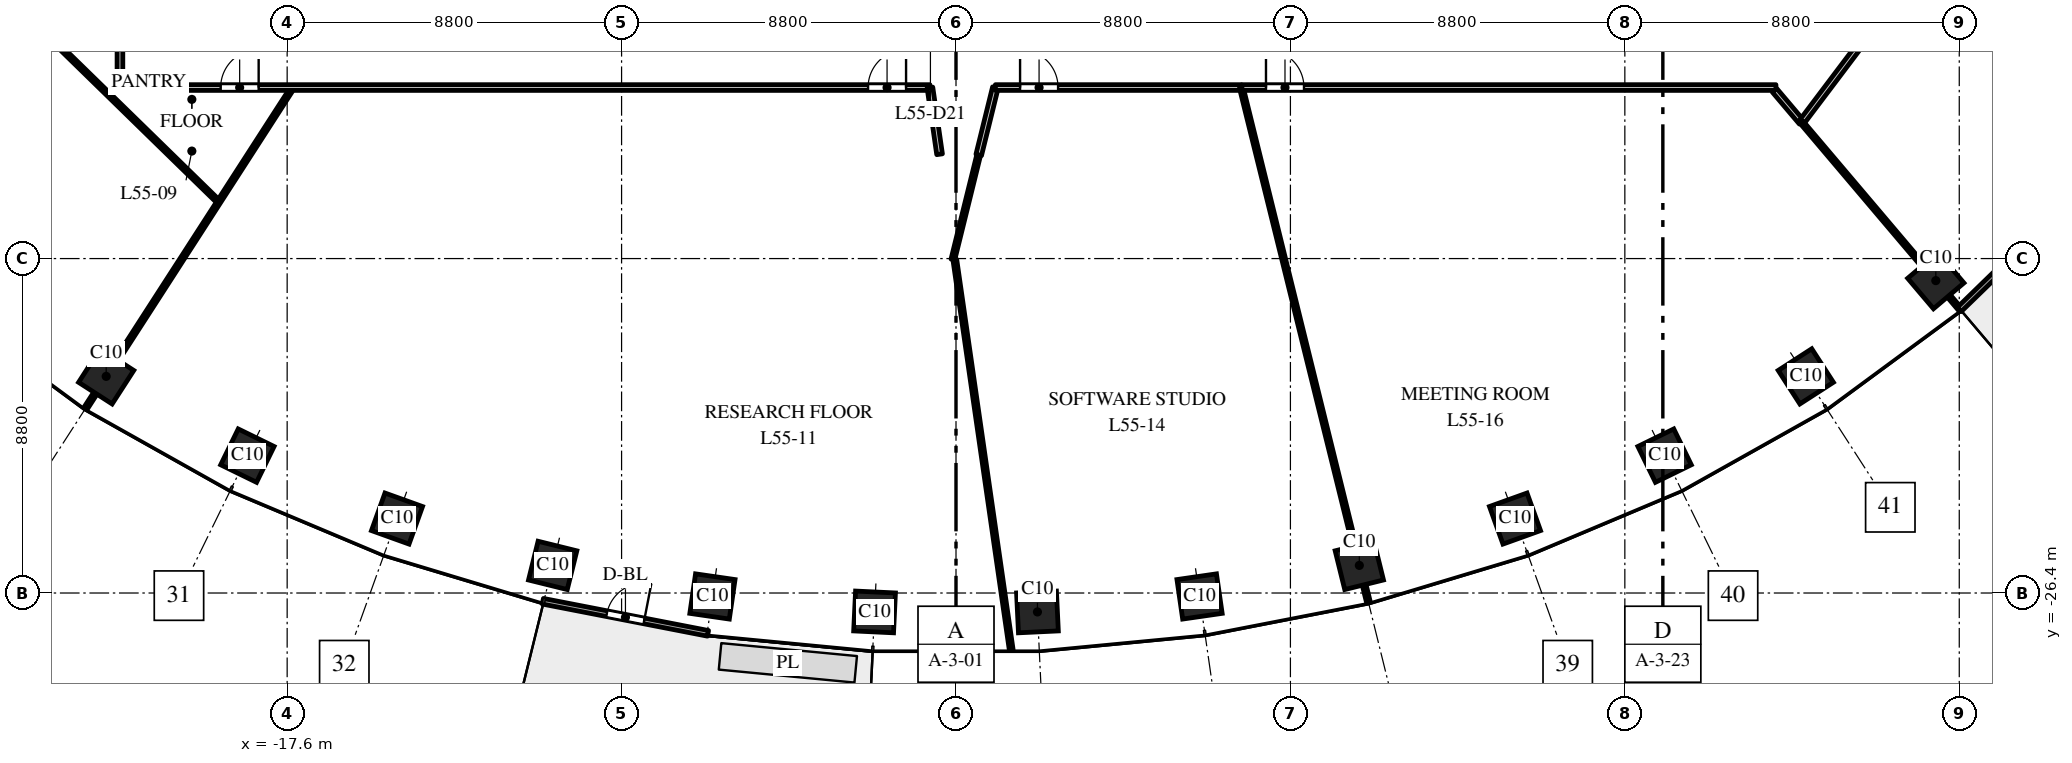
"""IFC4 building model, lengths in metres.
Left out: names, types, materials, properties, quantities, classifications, styles, units other than length and angle.
Written with IfcOpenShell. Run it as: python <this file> out.ifc"""

import sys

from ifc_helpers import new_model, si_unit, direction, frame, frame_2d, origin, origin_2d, place, context, subcontext, project, spatial, rectangle, extrude, element, fill, save


model = new_model("IFC4")
c1 = context("Model", 3, precision=1e-05, world=origin(), true_north=direction((0.0, 1.0)))
c2 = subcontext(c1, "Body", "Model", "MODEL_VIEW")
j1 = project(units=[si_unit("LENGTHUNIT", "METRE"), si_unit("PLANEANGLEUNIT", "RADIAN")], contexts=[c1])
p1 = place(None, origin())
s1 = spatial("IfcSite", under=j1, at=p1, CompositionType="ELEMENT")
p2 = place(p1, origin())
s2 = spatial("IfcBuilding", under=s1, at=p2, CompositionType="ELEMENT")
p3 = place(p2, frame((0.0, 0.0, 261.5)))
s3 = spatial("IfcBuildingStorey", under=s2, at=p3, CompositionType="ELEMENT", Elevation=261.5)
for number, where, z_axis, x_axis in (
    (1, (-22.362, -20.7, 0.0), (0.0, 0.0, 1.0), (0.84, -0.542, 0.0)),
    (2, (-18.646, -22.785, 0.0), (0.0, 0.0, 1.0), (0.898, -0.439, 0.0)),
    (3, (-14.709, -24.441, 0.0), (0.0, 0.0, 1.0), (0.941, -0.338, 0.0)),
    (4, (-10.613, -25.674, 0.0), (0.0, 0.0, 1.0), (0.971, -0.24, 0.0)),
    (5, (-6.409, -26.491, 0.0), (0.0, 0.0, 1.0), (0.99, -0.143, 0.0)),
    (6, (-2.143, -26.898, 0.0), (0.0, 0.0, 1.0), (0.999, -0.048, 0.0)),
    (7, (2.143, -26.898, 0.0), (0.0, 0.0, 1.0), (0.999, 0.048, 0.0)),
    (8, (6.409, -26.491, 0.0), (0.0, 0.0, 1.0), (0.99, 0.143, 0.0)),
    (9, (10.613, -25.674, 0.0), (0.0, 0.0, 1.0), (0.971, 0.24, 0.0)),
    (10, (14.709, -24.441, 0.0), (0.0, 0.0, 1.0), (0.941, 0.338, 0.0)),
    (11, (18.646, -22.785, 0.0), (0.0, 0.0, 1.0), (0.898, 0.439, 0.0)),
    (12, (22.362, -20.7, 0.0), (0.0, 0.0, 1.0), (0.84, 0.542, 0.0)),
    (13, (25.783, -18.18, 0.0), (0.0, 0.0, 1.0), (0.763, 0.646, 0.0)),
):
    element("IfcColumn", number, at=place(p3, frame(where, z_axis=z_axis, x_axis=x_axis)), inside=s3, PredefinedType="COLUMN", context=c2, shape_type="SweptSolid", body=[
        extrude(rectangle(XDim=1.05, YDim=1.05, at=origin_2d()), origin(), (0.0, 0.0, 1.0), 4.0),
    ])
p4 = place(p3, frame((-10.871, -26.617, 0.0), z_axis=(0.0, 0.0, 1.0), x_axis=(0.981631174778, -0.190788460615, 0.0)))
e14 = element("IfcWall", 14, at=p4, inside=s3, PredefinedType="STANDARD", context=c2, shape_type="SweptSolid", body=[
    extrude(rectangle(XDim=4.426, YDim=0.15, at=frame_2d((2.213, 0.0))), origin(), (0.0, 0.0, 1.0), 3.7),
])
p5 = place(p4, frame((1.713, 0.0, 0.0)))
e15 = element("IfcOpeningElement", 15, at=p5, cuts=e14, PredefinedType="OPENING", context=c2, shape_type="SweptSolid", body=[
    extrude(rectangle(XDim=1.0, YDim=2.4, at=frame_2d((0.5, 1.2))), frame((0.0, 0.085, 0.0), z_axis=(0.0, -1.0, 0.0), x_axis=(1.0, 0.0, 0.0)), (0.0, 0.0, 1.0), 0.17),
])
p6 = place(p3, frame((26.396, -18.943, 0.0), z_axis=(0.0, 0.0, 1.0), x_axis=(0.717214761864, 0.696852197647, 0.0)))
e16 = element("IfcWall", 16, at=p6, inside=s3, PredefinedType="STANDARD", context=c2, shape_type="SweptSolid", body=[
    extrude(rectangle(XDim=4.424, YDim=0.15, at=frame_2d((2.212, 0.0))), origin(), (0.0, 0.0, 1.0), 3.7),
])
p7 = place(p6, frame((1.712, 0.0, 0.0)))
e17 = element("IfcOpeningElement", 17, at=p7, cuts=e16, PredefinedType="OPENING", context=c2, shape_type="SweptSolid", body=[
    extrude(rectangle(XDim=1.0, YDim=2.4, at=frame_2d((0.5, 1.2))), frame((0.0, 0.085, 0.0), z_axis=(0.0, -1.0, 0.0), x_axis=(1.0, 0.0, 0.0)), (0.0, 0.0, 1.0), 0.17),
])
p8 = place(p3, frame((-24.866, -10.778, 0.0), z_axis=(0.0, 0.0, 1.0), x_axis=(0.715632814242, -0.698476681916, 0.0)))
e18 = element("IfcWall", 18, at=p8, inside=s3, PredefinedType="PARTITIONING", context=c2, shape_type="SweptSolid", body=[
    extrude(rectangle(XDim=7.585, YDim=0.1, at=frame_2d((3.792, 0.0))), origin(), (0.0, 0.0, 1.0), 2.75),
])
p9 = place(p3, frame((-22.905, -21.542, 0.0), z_axis=(0.0, 0.0, 1.0), x_axis=(0.542277075573, 0.840199722273, 0.0)))
e19 = element("IfcWall", 19, at=p9, inside=s3, PredefinedType="PARTITIONING", context=c2, shape_type="SweptSolid", body=[
    extrude(rectangle(XDim=9.958, YDim=0.1, at=frame_2d((4.979, 0.0))), origin(), (0.0, 0.0, 1.0), 3.0),
])
p10 = place(p3, frame((-22.0, -13.1, 0.0), z_axis=(0.0, 0.0, 1.0), x_axis=(0.0, 1.0, 0.0)))
e20 = element("IfcWall", 20, at=p10, inside=s3, PredefinedType="PARTITIONING", context=c2, shape_type="SweptSolid", body=[
    extrude(rectangle(XDim=2.4, YDim=0.15, at=frame_2d((1.2, 0.0))), origin(), (0.0, 0.0, 1.0), 3.7),
])
p11 = place(p3, frame((-22.0, -13.1, 0.0), z_axis=(0.0, 0.0, 1.0), x_axis=(1.0, 0.0, 0.0)))
e21 = element("IfcWall", 21, at=p11, inside=s3, PredefinedType="PARTITIONING", context=c2, shape_type="SweptSolid", body=[
    extrude(rectangle(XDim=21.314, YDim=0.15, at=frame_2d((10.657, 0.0))), origin(), (0.0, 0.0, 1.0), 2.75),
])
p12 = place(p11, frame((2.65, 0.0, 0.0)))
e22 = element("IfcOpeningElement", 22, at=p12, cuts=e21, PredefinedType="OPENING", context=c2, shape_type="SweptSolid", body=[
    extrude(rectangle(XDim=1.0, YDim=2.1, at=frame_2d((0.5, 1.05))), frame((0.0, 0.085, 0.0), z_axis=(0.0, -1.0, 0.0), x_axis=(1.0, 0.0, 0.0)), (0.0, 0.0, 1.0), 0.17),
])
p13 = place(p11, frame((19.686, 0.0, 0.0)))
e23 = element("IfcOpeningElement", 23, at=p13, cuts=e21, PredefinedType="OPENING", context=c2, shape_type="SweptSolid", body=[
    extrude(rectangle(XDim=1.0, YDim=2.1, at=frame_2d((0.5, 1.05))), frame((0.0, 0.085, 0.0), z_axis=(0.0, -1.0, 0.0), x_axis=(1.0, 0.0, 0.0)), (0.0, 0.0, 1.0), 0.17),
])
p14 = place(p3, frame((-0.686, -13.1, 0.0), z_axis=(0.0, 0.0, 1.0), x_axis=(0.143329398439, -0.989675039366, 0.0)))
e24 = element("IfcWall", 24, at=p14, inside=s3, PredefinedType="PARTITIONING", context=c2, shape_type="SweptSolid", body=[
    extrude(rectangle(XDim=1.773, YDim=0.15, at=frame_2d((0.887, 0.0))), origin(), (0.0, 0.0, 1.0), 3.7),
])
p15 = place(p3, frame((-0.082, -17.625, 0.0), z_axis=(0.0, 0.0, 1.0), x_axis=(0.23980869536, 0.970820163382, 0.0)))
e25 = element("IfcWall", 25, at=p15, inside=s3, PredefinedType="PARTITIONING", context=c2, shape_type="SweptSolid", body=[
    extrude(rectangle(XDim=2.803, YDim=0.1, at=frame_2d((1.401, 0.0))), origin(), (0.0, 0.0, 1.0), 3.7),
])
p16 = place(p3, frame((-0.031, -17.628, 0.0), z_axis=(0.0, 0.0, 1.0), x_axis=(0.143055546046, -0.989714661276, 0.0)))
e26 = element("IfcWall", 26, at=p16, inside=s3, PredefinedType="PARTITIONING", context=c2, shape_type="SweptSolid", body=[
    extrude(rectangle(XDim=10.373, YDim=0.1, at=frame_2d((5.187, 0.0))), origin(), (0.0, 0.0, 1.0), 3.0),
])
p17 = place(p3, frame((0.598, -14.874, 0.0), z_axis=(0.0, 0.0, 1.0), x_axis=(0.239705101821, 0.970845746842, 0.0)))
e27 = element("IfcWall", 27, at=p17, inside=s3, PredefinedType="PARTITIONING", context=c2, shape_type="SweptSolid", body=[
    extrude(rectangle(XDim=1.827, YDim=0.15, at=frame_2d((0.914, 0.0))), origin(), (0.0, 0.0, 1.0), 3.7),
])
p18 = place(p3, frame((1.036, -13.1, 0.0), z_axis=(0.0, 0.0, 1.0), x_axis=(1.0, 0.0, 0.0)))
e28 = element("IfcWall", 28, at=p18, inside=s3, PredefinedType="PARTITIONING", context=c2, shape_type="SweptSolid", body=[
    extrude(rectangle(XDim=6.471, YDim=0.15, at=frame_2d((3.236, 0.0))), origin(), (0.0, 0.0, 1.0), 2.85),
])
p19 = place(p18, frame((0.65, 0.0, 0.0)))
e29 = element("IfcOpeningElement", 29, at=p19, cuts=e28, PredefinedType="OPENING", context=c2, shape_type="SweptSolid", body=[
    extrude(rectangle(XDim=1.0, YDim=2.1, at=frame_2d((0.5, 1.05))), frame((0.0, 0.085, 0.0), z_axis=(0.0, -1.0, 0.0), x_axis=(1.0, 0.0, 0.0)), (0.0, 0.0, 1.0), 0.17),
])
p20 = place(p3, frame((7.507, -13.1, 0.0), z_axis=(0.0, 0.0, 1.0), x_axis=(0.23986692401, -0.970805778086, 0.0)))
e30 = element("IfcWall", 30, at=p20, inside=s3, PredefinedType="PARTITIONING", context=c2, shape_type="SweptSolid", body=[
    extrude(rectangle(XDim=13.953, YDim=0.1, at=frame_2d((6.977, 0.0))), origin(), (0.0, 0.0, 1.0), 3.0),
])
p21 = place(p3, frame((7.524, -13.1, 0.0), z_axis=(0.0, 0.0, 1.0), x_axis=(1.0, 0.0, 0.0)))
e31 = element("IfcWall", 31, at=p21, inside=s3, PredefinedType="PARTITIONING", context=c2, shape_type="SweptSolid", body=[
    extrude(rectangle(XDim=14.052, YDim=0.15, at=frame_2d((7.026, 0.0))), origin(), (0.0, 0.0, 1.0), 2.85),
])
p22 = place(p21, frame((0.633, 0.0, 0.0)))
e32 = element("IfcOpeningElement", 32, at=p22, cuts=e31, PredefinedType="OPENING", context=c2, shape_type="SweptSolid", body=[
    extrude(rectangle(XDim=1.0, YDim=2.1, at=frame_2d((0.5, 1.05))), frame((0.0, 0.085, 0.0), z_axis=(0.0, -1.0, 0.0), x_axis=(1.0, 0.0, 0.0)), (0.0, 0.0, 1.0), 0.17),
])
p23 = place(p3, frame((21.541, -13.175, 0.0), z_axis=(0.0, 0.0, 1.0), x_axis=(0.646460291141, -0.762947633837, 0.0)))
e33 = element("IfcWall", 33, at=p23, inside=s3, PredefinedType="PARTITIONING", context=c2, shape_type="SweptSolid", body=[
    extrude(rectangle(XDim=1.098, YDim=0.15, at=frame_2d((0.549, 0.0))), origin(), (0.0, 0.0, 1.0), 3.7),
])
p24 = place(p3, frame((22.251, -14.013, 0.0), z_axis=(0.0, 0.0, 1.0), x_axis=(0.602435944628, 0.798167233492, 0.0)))
e34 = element("IfcWall", 34, at=p24, inside=s3, PredefinedType="PARTITIONING", context=c2, shape_type="SweptSolid", body=[
    extrude(rectangle(XDim=4.245, YDim=0.15, at=frame_2d((2.122, 0.0))), origin(), (0.0, 0.0, 1.0), 2.75),
])
p25 = place(p3, frame((22.251, -14.013, 0.0), z_axis=(0.0, 0.0, 1.0), x_axis=(0.646448300096, -0.76295779392, 0.0)))
e35 = element("IfcWall", 35, at=p25, inside=s3, PredefinedType="PARTITIONING", context=c2, shape_type="SweptSolid", body=[
    extrude(rectangle(XDim=6.465, YDim=0.1, at=frame_2d((3.232, 0.0))), origin(), (0.0, 0.0, 1.0), 3.0),
])
p26 = place(p5, origin())
e36 = element("IfcDoor", 36, at=p26, inside=s3, OperationType="SINGLE_SWING_RIGHT", PredefinedType="DOOR", context=c2, shape_type="SweptSolid", body=[
    extrude(rectangle(XDim=1.0, YDim=2.4, at=frame_2d((0.5, 1.2))), frame((0.0, 0.025, 0.0), z_axis=(0.0, -1.0, 0.0), x_axis=(1.0, 0.0, 0.0)), (0.0, 0.0, 1.0), 0.05),
])
fill(e15, e36)
p27 = place(p12, origin())
e37 = element("IfcDoor", 37, at=p27, inside=s3, OperationType="SINGLE_SWING_RIGHT", PredefinedType="DOOR", context=c2, shape_type="SweptSolid", body=[
    extrude(rectangle(XDim=1.0, YDim=2.1, at=frame_2d((0.5, 1.05))), frame((0.0, 0.025, 0.0), z_axis=(0.0, -1.0, 0.0), x_axis=(1.0, 0.0, 0.0)), (0.0, 0.0, 1.0), 0.05),
])
fill(e22, e37)
p28 = place(p13, origin())
e38 = element("IfcDoor", 38, at=p28, inside=s3, OperationType="SINGLE_SWING_RIGHT", PredefinedType="DOOR", context=c2, shape_type="SweptSolid", body=[
    extrude(rectangle(XDim=1.0, YDim=2.1, at=frame_2d((0.5, 1.05))), frame((0.0, 0.025, 0.0), z_axis=(0.0, -1.0, 0.0), x_axis=(1.0, 0.0, 0.0)), (0.0, 0.0, 1.0), 0.05),
])
fill(e23, e38)
p29 = place(p19, origin())
e39 = element("IfcDoor", 39, at=p29, inside=s3, OperationType="SINGLE_SWING_LEFT", PredefinedType="DOOR", context=c2, shape_type="SweptSolid", body=[
    extrude(rectangle(XDim=1.0, YDim=2.1, at=frame_2d((0.5, 1.05))), frame((0.0, 0.025, 0.0), z_axis=(0.0, -1.0, 0.0), x_axis=(1.0, 0.0, 0.0)), (0.0, 0.0, 1.0), 0.05),
])
fill(e29, e39)
p30 = place(p22, origin())
e40 = element("IfcDoor", 40, at=p30, inside=s3, OperationType="SINGLE_SWING_LEFT", PredefinedType="DOOR", context=c2, shape_type="SweptSolid", body=[
    extrude(rectangle(XDim=1.0, YDim=2.1, at=frame_2d((0.5, 1.05))), frame((0.0, 0.025, 0.0), z_axis=(0.0, -1.0, 0.0), x_axis=(1.0, 0.0, 0.0)), (0.0, 0.0, 1.0), 0.05),
])
fill(e32, e40)
save(model, sys.argv[1])
